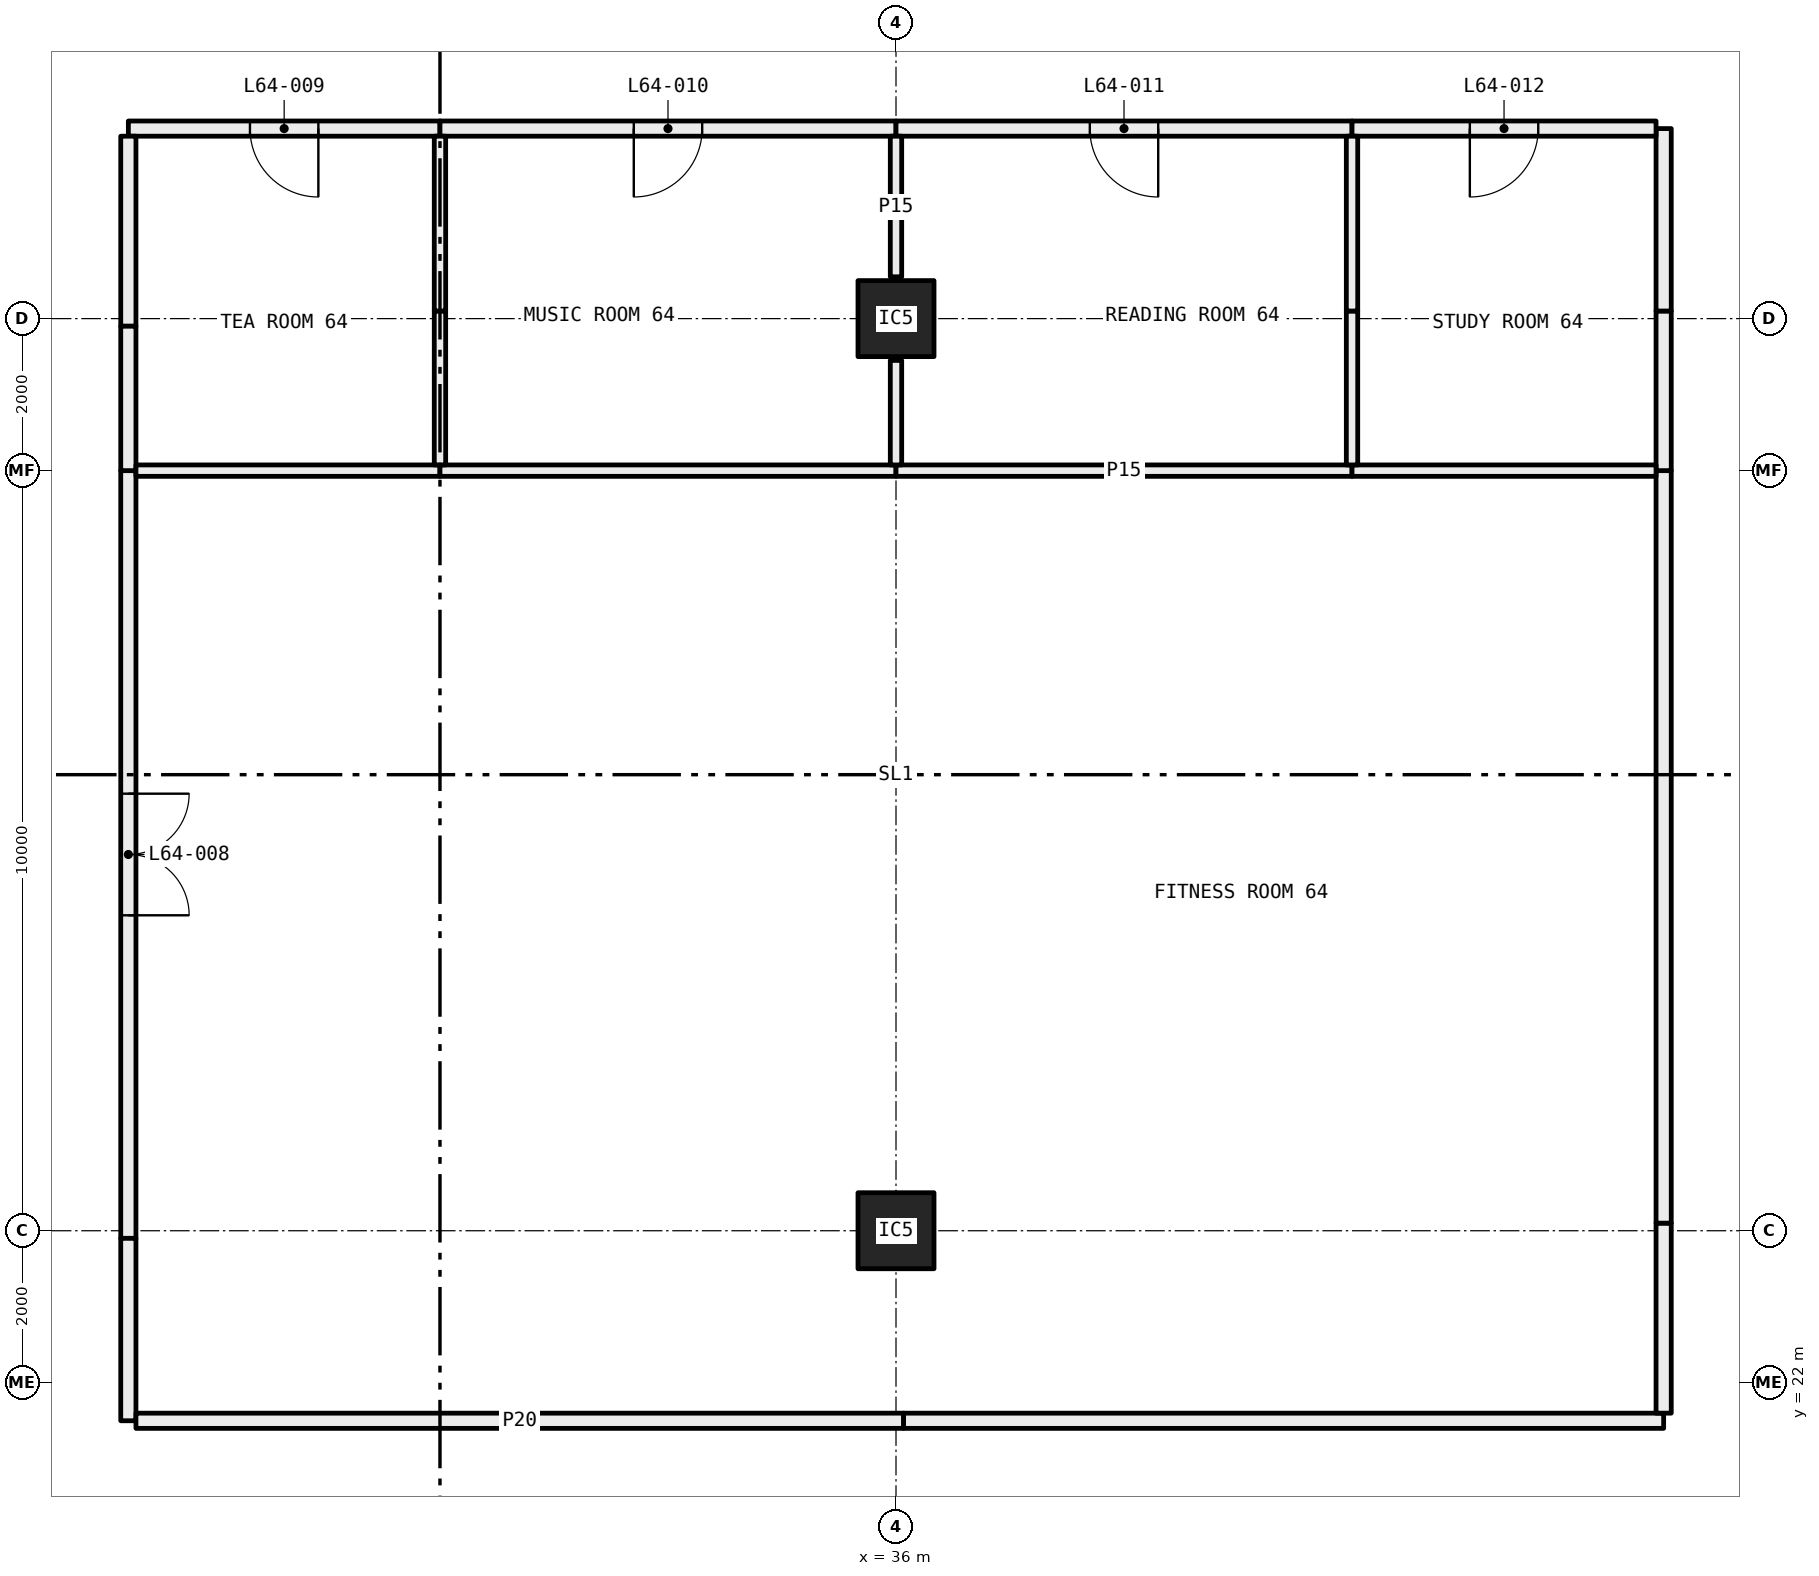
"""IFC4 building model, lengths in metres.
Left out: names, types, materials, properties, quantities, classifications, styles, units other than length and angle.
Written with IfcOpenShell. Run it as: python <this file> out.ifc"""

import sys

from ifc_helpers import new_model, si_unit, direction, frame, frame_2d, origin, origin_2d, place, context, subcontext, project, spatial, rectangle, hollow_rectangle, extrude, element, fill, save


model = new_model("IFC4")
c1 = context("Model", 3, precision=1e-05, world=origin(), true_north=direction((0.0, 1.0)))
c2 = subcontext(c1, "Body", "Model", "MODEL_VIEW")
j1 = project(units=[si_unit("LENGTHUNIT", "METRE"), si_unit("PLANEANGLEUNIT", "RADIAN")], contexts=[c1])
p1 = place(None, origin())
s1 = spatial("IfcSite", under=j1, at=p1, CompositionType="ELEMENT")
p2 = place(p1, origin())
s2 = spatial("IfcBuilding", under=s1, at=p2, CompositionType="ELEMENT")
p3 = place(p2, frame((0.0, 0.0, 238.65)))
s3 = spatial("IfcBuildingStorey", under=s2, at=p3, CompositionType="ELEMENT", Elevation=238.65)
for number, where, z_axis, x_axis in (
    (1, (36.0, 24.0, 0.0), (0.0, 0.0, 1.0), (1.0, 0.0, 0.0)),
    (2, (36.0, 36.0, 0.0), (0.0, 0.0, 1.0), (1.0, 0.0, 0.0)),
):
    element("IfcColumn", number, at=place(p3, frame(where, z_axis=z_axis, x_axis=x_axis)), inside=s3, PredefinedType="COLUMN", context=c2, shape_type="SweptSolid", body=[
        extrude(hollow_rectangle(XDim=1.0, YDim=1.0, WallThickness=0.04, at=origin_2d()), origin(), (0.0, 0.0, 1.0), 3.05),
    ])
p4 = place(p3, frame((25.9, 34.0, 0.0), z_axis=(0.0, 0.0, 1.0), x_axis=(0.0, -1.0, 0.0)))
e3 = element("IfcWall", 3, at=p4, inside=s3, PredefinedType="PARTITIONING", context=c2, shape_type="SweptSolid", body=[
    extrude(rectangle(XDim=10.1, YDim=0.2, at=frame_2d((5.05, 0.0))), origin(), (0.0, 0.0, 1.0), 2.45),
])
p5 = place(p4, frame((4.25, 0.0, 0.0)))
e4 = element("IfcOpeningElement", 4, at=p5, cuts=e3, PredefinedType="OPENING", context=c2, shape_type="SweptSolid", body=[
    extrude(rectangle(XDim=1.6, YDim=2.1, at=frame_2d((0.8, 1.05))), frame((0.0, 0.11, 0.0), z_axis=(0.0, -1.0, 0.0), x_axis=(1.0, 0.0, 0.0)), (0.0, 0.0, 1.0), 0.22),
])
p6 = place(p3, frame((25.9, 23.9, 0.0), z_axis=(0.0, 0.0, 1.0), x_axis=(0.0, -1.0, 0.0)))
e5 = element("IfcWall", 5, at=p6, inside=s3, PredefinedType="PARTITIONING", context=c2, shape_type="SweptSolid", body=[
    extrude(rectangle(XDim=2.4, YDim=0.2, at=frame_2d((1.2, 0.0))), origin(), (0.0, 0.0, 1.0), 3.05),
])
p7 = place(p3, frame((26.0, 21.5, 0.0), z_axis=(0.0, 0.0, 1.0), x_axis=(1.0, 0.0, 0.0)))
e6 = element("IfcWall", 6, at=p7, inside=s3, PredefinedType="PARTITIONING", context=c2, shape_type="SweptSolid", body=[
    extrude(rectangle(XDim=10.1, YDim=0.2, at=frame_2d((5.05, 0.0))), origin(), (0.0, 0.0, 1.0), 2.45),
])
p8 = place(p3, frame((36.1, 21.5, 0.0), z_axis=(0.0, 0.0, 1.0), x_axis=(1.0, 0.0, 0.0)))
e7 = element("IfcWall", 7, at=p8, inside=s3, PredefinedType="PARTITIONING", context=c2, shape_type="SweptSolid", body=[
    extrude(rectangle(XDim=10.0, YDim=0.2, at=frame_2d((5.0, 0.0))), origin(), (0.0, 0.0, 1.0), 3.05),
])
p9 = place(p3, frame((46.1, 21.6, 0.0), z_axis=(0.0, 0.0, 1.0), x_axis=(0.0, 1.0, 0.0)))
e8 = element("IfcWall", 8, at=p9, inside=s3, PredefinedType="PARTITIONING", context=c2, shape_type="SweptSolid", body=[
    extrude(rectangle(XDim=2.5, YDim=0.2, at=frame_2d((1.25, 0.0))), origin(), (0.0, 0.0, 1.0), 2.45),
])
p10 = place(p3, frame((46.1, 24.1, 0.0), z_axis=(0.0, 0.0, 1.0), x_axis=(0.0, 1.0, 0.0)))
e9 = element("IfcWall", 9, at=p10, inside=s3, PredefinedType="PARTITIONING", context=c2, shape_type="SweptSolid", body=[
    extrude(rectangle(XDim=9.9, YDim=0.2, at=frame_2d((4.95, 0.0))), origin(), (0.0, 0.0, 1.0), 3.05),
])
p11 = place(p3, frame((30.0, 38.5, 0.0), z_axis=(0.0, 0.0, 1.0), x_axis=(-1.0, 0.0, 0.0)))
e10 = element("IfcWall", 10, at=p11, inside=s3, PredefinedType="PARTITIONING", context=c2, shape_type="SweptSolid", body=[
    extrude(rectangle(XDim=4.1, YDim=0.2, at=frame_2d((2.05, 0.0))), origin(), (0.0, 0.0, 1.0), 3.05),
])
p12 = place(p11, frame((1.6, 0.0, 0.0)))
e11 = element("IfcOpeningElement", 11, at=p12, cuts=e10, PredefinedType="OPENING", context=c2, shape_type="SweptSolid", body=[
    extrude(rectangle(XDim=0.9, YDim=2.1, at=frame_2d((0.45, 1.05))), frame((0.0, 0.11, 0.0), z_axis=(0.0, -1.0, 0.0), x_axis=(1.0, 0.0, 0.0)), (0.0, 0.0, 1.0), 0.22),
])
p13 = place(p3, frame((25.9, 38.4, 0.0), z_axis=(0.0, 0.0, 1.0), x_axis=(0.0, -1.0, 0.0)))
e12 = element("IfcWall", 12, at=p13, inside=s3, PredefinedType="PARTITIONING", context=c2, shape_type="SweptSolid", body=[
    extrude(rectangle(XDim=2.5, YDim=0.2, at=frame_2d((1.25, 0.0))), origin(), (0.0, 0.0, 1.0), 2.45),
])
p14 = place(p3, frame((25.9, 35.9, 0.0), z_axis=(0.0, 0.0, 1.0), x_axis=(0.0, -1.0, 0.0)))
e13 = element("IfcWall", 13, at=p14, inside=s3, PredefinedType="PARTITIONING", context=c2, shape_type="SweptSolid", body=[
    extrude(rectangle(XDim=1.9, YDim=0.2, at=frame_2d((0.95, 0.0))), origin(), (0.0, 0.0, 1.0), 3.05),
])
p15 = place(p3, frame((36.0, 38.5, 0.0), z_axis=(0.0, 0.0, 1.0), x_axis=(-1.0, 0.0, 0.0)))
e14 = element("IfcWall", 14, at=p15, inside=s3, PredefinedType="PARTITIONING", context=c2, shape_type="SweptSolid", body=[
    extrude(rectangle(XDim=6.0, YDim=0.2, at=frame_2d((3.0, 0.0))), origin(), (0.0, 0.0, 1.0), 2.45),
])
p16 = place(p15, frame((2.55, 0.0, 0.0)))
e15 = element("IfcOpeningElement", 15, at=p16, cuts=e14, PredefinedType="OPENING", context=c2, shape_type="SweptSolid", body=[
    extrude(rectangle(XDim=0.9, YDim=2.1, at=frame_2d((0.45, 1.05))), frame((0.0, 0.11, 0.0), z_axis=(0.0, -1.0, 0.0), x_axis=(1.0, 0.0, 0.0)), (0.0, 0.0, 1.0), 0.22),
])
p17 = place(p3, frame((42.0, 38.5, 0.0), z_axis=(0.0, 0.0, 1.0), x_axis=(-1.0, 0.0, 0.0)))
e16 = element("IfcWall", 16, at=p17, inside=s3, PredefinedType="PARTITIONING", context=c2, shape_type="SweptSolid", body=[
    extrude(rectangle(XDim=6.0, YDim=0.2, at=frame_2d((3.0, 0.0))), origin(), (0.0, 0.0, 1.0), 2.45),
])
p18 = place(p17, frame((2.55, 0.0, 0.0)))
e17 = element("IfcOpeningElement", 17, at=p18, cuts=e16, PredefinedType="OPENING", context=c2, shape_type="SweptSolid", body=[
    extrude(rectangle(XDim=0.9, YDim=2.1, at=frame_2d((0.45, 1.05))), frame((0.0, 0.11, 0.0), z_axis=(0.0, -1.0, 0.0), x_axis=(1.0, 0.0, 0.0)), (0.0, 0.0, 1.0), 0.22),
])
p19 = place(p3, frame((46.1, 34.0, 0.0), z_axis=(0.0, 0.0, 1.0), x_axis=(0.0, 1.0, 0.0)))
e18 = element("IfcWall", 18, at=p19, inside=s3, PredefinedType="PARTITIONING", context=c2, shape_type="SweptSolid", body=[
    extrude(rectangle(XDim=2.1, YDim=0.2, at=frame_2d((1.05, 0.0))), origin(), (0.0, 0.0, 1.0), 2.45),
])
p20 = place(p3, frame((46.1, 36.1, 0.0), z_axis=(0.0, 0.0, 1.0), x_axis=(0.0, 1.0, 0.0)))
e19 = element("IfcWall", 19, at=p20, inside=s3, PredefinedType="PARTITIONING", context=c2, shape_type="SweptSolid", body=[
    extrude(rectangle(XDim=2.4, YDim=0.2, at=frame_2d((1.2, 0.0))), origin(), (0.0, 0.0, 1.0), 3.05),
])
p21 = place(p3, frame((46.0, 38.5, 0.0), z_axis=(0.0, 0.0, 1.0), x_axis=(-1.0, 0.0, 0.0)))
e20 = element("IfcWall", 20, at=p21, inside=s3, PredefinedType="PARTITIONING", context=c2, shape_type="SweptSolid", body=[
    extrude(rectangle(XDim=4.0, YDim=0.2, at=frame_2d((2.0, 0.0))), origin(), (0.0, 0.0, 1.0), 3.05),
])
p22 = place(p21, frame((1.55, 0.0, 0.0)))
e21 = element("IfcOpeningElement", 21, at=p22, cuts=e20, PredefinedType="OPENING", context=c2, shape_type="SweptSolid", body=[
    extrude(rectangle(XDim=0.9, YDim=2.1, at=frame_2d((0.45, 1.05))), frame((0.0, 0.11, 0.0), z_axis=(0.0, -1.0, 0.0), x_axis=(1.0, 0.0, 0.0)), (0.0, 0.0, 1.0), 0.22),
])
p23 = place(p3, frame((30.0, 34.0, 0.0), z_axis=(0.0, 0.0, 1.0), x_axis=(-1.0, 0.0, 0.0)))
e22 = element("IfcWall", 22, at=p23, inside=s3, PredefinedType="PARTITIONING", context=c2, shape_type="SweptSolid", body=[
    extrude(rectangle(XDim=4.0, YDim=0.15, at=frame_2d((2.0, 0.0))), origin(), (0.0, 0.0, 1.0), 3.05),
])
for number, where, z_axis, x_axis in (
    (23, (36.0, 34.0, 0.0), (0.0, 0.0, 1.0), (-1.0, 0.0, 0.0)),
    (24, (42.0, 34.0, 0.0), (0.0, 0.0, 1.0), (-1.0, 0.0, 0.0)),
):
    element("IfcWall", number, at=place(p3, frame(where, z_axis=z_axis, x_axis=x_axis)), inside=s3, PredefinedType="PARTITIONING", context=c2, shape_type="SweptSolid", body=[
        extrude(rectangle(XDim=6.0, YDim=0.15, at=frame_2d((3.0, 0.0))), origin(), (0.0, 0.0, 1.0), 2.45),
    ])
p24 = place(p3, frame((46.0, 34.0, 0.0), z_axis=(0.0, 0.0, 1.0), x_axis=(-1.0, 0.0, 0.0)))
e25 = element("IfcWall", 25, at=p24, inside=s3, PredefinedType="PARTITIONING", context=c2, shape_type="SweptSolid", body=[
    extrude(rectangle(XDim=4.0, YDim=0.15, at=frame_2d((2.0, 0.0))), origin(), (0.0, 0.0, 1.0), 3.05),
])
p25 = place(p3, frame((30.0, 34.075, 0.0), z_axis=(0.0, 0.0, 1.0), x_axis=(0.0, 1.0, 0.0)))
e26 = element("IfcWall", 26, at=p25, inside=s3, PredefinedType="PARTITIONING", context=c2, shape_type="SweptSolid", body=[
    extrude(rectangle(XDim=2.025, YDim=0.15, at=frame_2d((1.013, 0.0))), origin(), (0.0, 0.0, 1.0), 2.45),
])
p26 = place(p3, frame((30.0, 36.1, 0.0), z_axis=(0.0, 0.0, 1.0), x_axis=(0.0, 1.0, 0.0)))
e27 = element("IfcWall", 27, at=p26, inside=s3, PredefinedType="PARTITIONING", context=c2, shape_type="SweptSolid", body=[
    extrude(rectangle(XDim=2.3, YDim=0.15, at=frame_2d((1.15, 0.0))), origin(), (0.0, 0.0, 1.0), 3.05),
])
p27 = place(p3, frame((36.0, 34.075, 0.0), z_axis=(0.0, 0.0, 1.0), x_axis=(0.0, 1.0, 0.0)))
e28 = element("IfcWall", 28, at=p27, inside=s3, PredefinedType="PARTITIONING", context=c2, shape_type="SweptSolid", body=[
    extrude(rectangle(XDim=1.375, YDim=0.15, at=frame_2d((0.688, 0.0))), origin(), (0.0, 0.0, 1.0), 2.45),
])
p28 = place(p3, frame((36.0, 36.55, 0.0), z_axis=(0.0, 0.0, 1.0), x_axis=(0.0, 1.0, 0.0)))
e29 = element("IfcWall", 29, at=p28, inside=s3, PredefinedType="PARTITIONING", context=c2, shape_type="SweptSolid", body=[
    extrude(rectangle(XDim=1.85, YDim=0.15, at=frame_2d((0.925, 0.0))), origin(), (0.0, 0.0, 1.0), 2.45),
])
p29 = place(p3, frame((42.0, 34.075, 0.0), z_axis=(0.0, 0.0, 1.0), x_axis=(0.0, 1.0, 0.0)))
e30 = element("IfcWall", 30, at=p29, inside=s3, PredefinedType="PARTITIONING", context=c2, shape_type="SweptSolid", body=[
    extrude(rectangle(XDim=2.025, YDim=0.15, at=frame_2d((1.013, 0.0))), origin(), (0.0, 0.0, 1.0), 2.45),
])
p30 = place(p3, frame((42.0, 36.1, 0.0), z_axis=(0.0, 0.0, 1.0), x_axis=(0.0, 1.0, 0.0)))
e31 = element("IfcWall", 31, at=p30, inside=s3, PredefinedType="PARTITIONING", context=c2, shape_type="SweptSolid", body=[
    extrude(rectangle(XDim=2.3, YDim=0.15, at=frame_2d((1.15, 0.0))), origin(), (0.0, 0.0, 1.0), 3.05),
])
p31 = place(p5, origin())
e32 = element("IfcDoor", 32, at=p31, inside=s3, OperationType="DOUBLE_DOOR_SINGLE_SWING", PredefinedType="DOOR", context=c2, shape_type="SweptSolid", body=[
    extrude(rectangle(XDim=1.6, YDim=2.1, at=frame_2d((0.8, 1.05))), frame((0.0, 0.025, 0.0), z_axis=(0.0, -1.0, 0.0), x_axis=(1.0, 0.0, 0.0)), (0.0, 0.0, 1.0), 0.05),
])
fill(e4, e32)
p32 = place(p12, origin())
e33 = element("IfcDoor", 33, at=p32, inside=s3, OperationType="SINGLE_SWING_RIGHT", PredefinedType="DOOR", context=c2, shape_type="SweptSolid", body=[
    extrude(rectangle(XDim=0.9, YDim=2.1, at=frame_2d((0.45, 1.05))), frame((0.0, 0.025, 0.0), z_axis=(0.0, -1.0, 0.0), x_axis=(1.0, 0.0, 0.0)), (0.0, 0.0, 1.0), 0.05),
])
fill(e11, e33)
p33 = place(p16, origin())
e34 = element("IfcDoor", 34, at=p33, inside=s3, OperationType="SINGLE_SWING_LEFT", PredefinedType="DOOR", context=c2, shape_type="SweptSolid", body=[
    extrude(rectangle(XDim=0.9, YDim=2.1, at=frame_2d((0.45, 1.05))), frame((0.0, 0.025, 0.0), z_axis=(0.0, -1.0, 0.0), x_axis=(1.0, 0.0, 0.0)), (0.0, 0.0, 1.0), 0.05),
])
fill(e15, e34)
p34 = place(p18, origin())
e35 = element("IfcDoor", 35, at=p34, inside=s3, OperationType="SINGLE_SWING_RIGHT", PredefinedType="DOOR", context=c2, shape_type="SweptSolid", body=[
    extrude(rectangle(XDim=0.9, YDim=2.1, at=frame_2d((0.45, 1.05))), frame((0.0, 0.025, 0.0), z_axis=(0.0, -1.0, 0.0), x_axis=(1.0, 0.0, 0.0)), (0.0, 0.0, 1.0), 0.05),
])
fill(e17, e35)
p35 = place(p22, origin())
e36 = element("IfcDoor", 36, at=p35, inside=s3, OperationType="SINGLE_SWING_LEFT", PredefinedType="DOOR", context=c2, shape_type="SweptSolid", body=[
    extrude(rectangle(XDim=0.9, YDim=2.1, at=frame_2d((0.45, 1.05))), frame((0.0, 0.025, 0.0), z_axis=(0.0, -1.0, 0.0), x_axis=(1.0, 0.0, 0.0)), (0.0, 0.0, 1.0), 0.05),
])
fill(e21, e36)
save(model, sys.argv[1])
